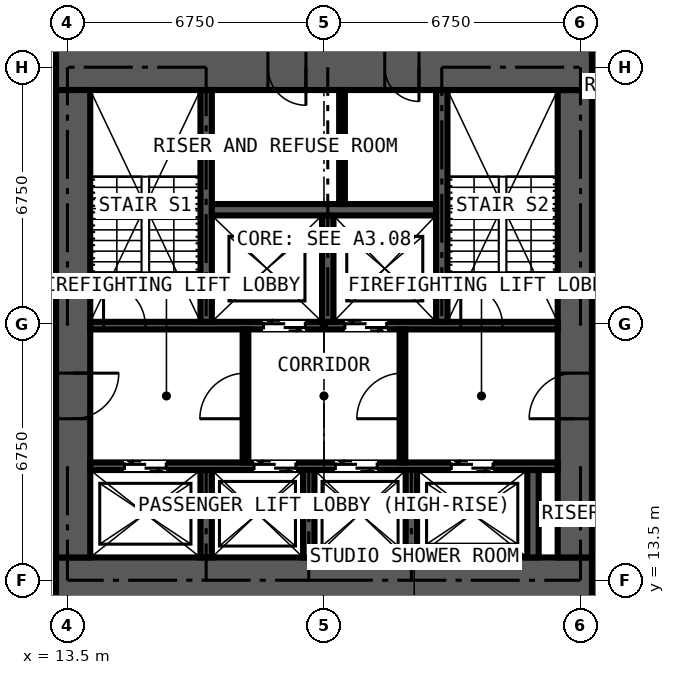
"""IFC4 building model, lengths in metres.
Left out: names, types, materials, properties, quantities, classifications, styles, units other than length and angle.
Written with IfcOpenShell. Run it as: python <this file> out.ifc"""

import sys

from ifc_helpers import new_model, si_unit, direction, frame, frame_2d, origin, place, context, subcontext, project, spatial, rectangle, extrude, element, fill, save


model = new_model("IFC4")
c1 = context("Model", 3, precision=1e-05, world=origin(), true_north=direction((0.0, 1.0)))
c2 = subcontext(c1, "Body", "Model", "MODEL_VIEW")
j1 = project(units=[si_unit("LENGTHUNIT", "METRE"), si_unit("PLANEANGLEUNIT", "RADIAN")], contexts=[c1])
p1 = place(None, origin())
s1 = spatial("IfcSite", under=j1, at=p1, CompositionType="ELEMENT")
p2 = place(p1, origin())
s2 = spatial("IfcBuilding", under=s1, at=p2, CompositionType="ELEMENT")
p3 = place(p2, frame((0.0, 0.0, 211.5)))
s3 = spatial("IfcBuildingStorey", under=s2, at=p3, CompositionType="ELEMENT", Elevation=211.5)
p4 = place(p3, frame((13.2, 13.5, 0.0), z_axis=(0.0, 0.0, 1.0), x_axis=(1.0, 0.0, 0.0)))
e1 = element("IfcWall", 1, at=p4, inside=s3, PredefinedType="SHEAR", context=c2, shape_type="SweptSolid", body=[
    extrude(rectangle(XDim=14.1, YDim=1.2, at=frame_2d((7.05, 0.0))), origin(), (0.0, 0.0, 1.0), 3.6),
])
p5 = place(p3, frame((26.85, 14.1, 0.0), z_axis=(0.0, 0.0, 1.0), x_axis=(0.0, 1.0, 0.0)))
e2 = element("IfcWall", 2, at=p5, inside=s3, PredefinedType="SHEAR", context=c2, shape_type="SweptSolid", body=[
    extrude(rectangle(XDim=12.3, YDim=0.9, at=frame_2d((6.15, 0.0))), origin(), (0.0, 0.0, 1.0), 3.6),
])
p6 = place(p5, frame((3.65, 0.0, 0.0)))
e3 = element("IfcOpeningElement", 3, at=p6, cuts=e2, PredefinedType="OPENING", context=c2, shape_type="SweptSolid", body=[
    extrude(rectangle(XDim=1.2, YDim=2.2, at=frame_2d((0.6, 1.1))), frame((0.0, 0.46, 0.0), z_axis=(0.0, -1.0, 0.0), x_axis=(1.0, 0.0, 0.0)), (0.0, 0.0, 1.0), 0.92),
])
p7 = place(p3, frame((27.3, 27.0, 0.0), z_axis=(0.0, 0.0, 1.0), x_axis=(-1.0, 0.0, 0.0)))
e4 = element("IfcWall", 4, at=p7, inside=s3, PredefinedType="SHEAR", context=c2, shape_type="SweptSolid", body=[
    extrude(rectangle(XDim=14.1, YDim=1.2, at=frame_2d((7.05, 0.0))), origin(), (0.0, 0.0, 1.0), 3.6),
])
p8 = place(p7, frame((4.55, 0.0, 0.0)))
e5 = element("IfcOpeningElement", 5, at=p8, cuts=e4, PredefinedType="OPENING", context=c2, shape_type="SweptSolid", body=[
    extrude(rectangle(XDim=0.9, YDim=2.2, at=frame_2d((0.45, 1.1))), frame((0.0, 0.61, 0.0), z_axis=(0.0, -1.0, 0.0), x_axis=(1.0, 0.0, 0.0)), (0.0, 0.0, 1.0), 1.22),
])
p9 = place(p7, frame((7.525, 0.0, 0.0)))
e6 = element("IfcOpeningElement", 6, at=p9, cuts=e4, PredefinedType="OPENING", context=c2, shape_type="SweptSolid", body=[
    extrude(rectangle(XDim=1.0, YDim=2.2, at=frame_2d((0.5, 1.1))), frame((0.0, 0.61, 0.0), z_axis=(0.0, -1.0, 0.0), x_axis=(1.0, 0.0, 0.0)), (0.0, 0.0, 1.0), 1.22),
])
p10 = place(p3, frame((13.65, 26.4, 0.0), z_axis=(0.0, 0.0, 1.0), x_axis=(0.0, -1.0, 0.0)))
e7 = element("IfcWall", 7, at=p10, inside=s3, PredefinedType="SHEAR", context=c2, shape_type="SweptSolid", body=[
    extrude(rectangle(XDim=12.3, YDim=0.9, at=frame_2d((6.15, 0.0))), origin(), (0.0, 0.0, 1.0), 3.6),
])
p11 = place(p10, frame((7.45, 0.0, 0.0)))
e8 = element("IfcOpeningElement", 8, at=p11, cuts=e7, PredefinedType="OPENING", context=c2, shape_type="SweptSolid", body=[
    extrude(rectangle(XDim=1.2, YDim=2.2, at=frame_2d((0.6, 1.1))), frame((0.0, 0.46, 0.0), z_axis=(0.0, -1.0, 0.0), x_axis=(1.0, 0.0, 0.0)), (0.0, 0.0, 1.0), 0.92),
])
p12 = place(p3, frame((14.1, 16.5, 0.0), z_axis=(0.0, 0.0, 1.0), x_axis=(1.0, 0.0, 0.0)))
e9 = element("IfcWall", 9, at=p12, inside=s3, PredefinedType="SHEAR", context=c2, shape_type="SweptSolid", body=[
    extrude(rectangle(XDim=12.3, YDim=0.2, at=frame_2d((6.15, 0.0))), origin(), (0.0, 0.0, 1.0), 3.6),
])
p13 = place(p12, frame((0.9, 0.0, 0.0)))
e10 = element("IfcOpeningElement", 10, at=p13, cuts=e9, PredefinedType="OPENING", context=c2, shape_type="SweptSolid", body=[
    extrude(rectangle(XDim=1.1, YDim=2.2, at=frame_2d((0.55, 1.1))), frame((0.0, 0.11, 0.0), z_axis=(0.0, -1.0, 0.0), x_axis=(1.0, 0.0, 0.0)), (0.0, 0.0, 1.0), 0.22),
])
p14 = place(p12, frame((4.31, 0.0, 0.0)))
e11 = element("IfcOpeningElement", 11, at=p14, cuts=e9, PredefinedType="OPENING", context=c2, shape_type="SweptSolid", body=[
    extrude(rectangle(XDim=1.1, YDim=2.2, at=frame_2d((0.55, 1.1))), frame((0.0, 0.11, 0.0), z_axis=(0.0, -1.0, 0.0), x_axis=(1.0, 0.0, 0.0)), (0.0, 0.0, 1.0), 0.22),
])
p15 = place(p12, frame((6.45, 0.0, 0.0)))
e12 = element("IfcOpeningElement", 12, at=p15, cuts=e9, PredefinedType="OPENING", context=c2, shape_type="SweptSolid", body=[
    extrude(rectangle(XDim=1.1, YDim=2.2, at=frame_2d((0.55, 1.1))), frame((0.0, 0.11, 0.0), z_axis=(0.0, -1.0, 0.0), x_axis=(1.0, 0.0, 0.0)), (0.0, 0.0, 1.0), 0.22),
])
p16 = place(p12, frame((9.5, 0.0, 0.0)))
e13 = element("IfcOpeningElement", 13, at=p16, cuts=e9, PredefinedType="OPENING", context=c2, shape_type="SweptSolid", body=[
    extrude(rectangle(XDim=1.1, YDim=2.2, at=frame_2d((0.55, 1.1))), frame((0.0, 0.11, 0.0), z_axis=(0.0, -1.0, 0.0), x_axis=(1.0, 0.0, 0.0)), (0.0, 0.0, 1.0), 0.22),
])
p17 = place(p3, frame((14.1, 20.2, 0.0), z_axis=(0.0, 0.0, 1.0), x_axis=(1.0, 0.0, 0.0)))
e14 = element("IfcWall", 14, at=p17, inside=s3, PredefinedType="SHEAR", context=c2, shape_type="SweptSolid", body=[
    extrude(rectangle(XDim=12.3, YDim=0.2, at=frame_2d((6.15, 0.0))), origin(), (0.0, 0.0, 1.0), 3.6),
])
p18 = place(p17, frame((4.56, 0.0, 0.0)))
e15 = element("IfcOpeningElement", 15, at=p18, cuts=e14, PredefinedType="OPENING", context=c2, shape_type="SweptSolid", body=[
    extrude(rectangle(XDim=1.1, YDim=2.2, at=frame_2d((0.55, 1.1))), frame((0.0, 0.11, 0.0), z_axis=(0.0, -1.0, 0.0), x_axis=(1.0, 0.0, 0.0)), (0.0, 0.0, 1.0), 0.22),
])
p19 = place(p17, frame((6.7, 0.0, 0.0)))
e16 = element("IfcOpeningElement", 16, at=p19, cuts=e14, PredefinedType="OPENING", context=c2, shape_type="SweptSolid", body=[
    extrude(rectangle(XDim=1.1, YDim=2.2, at=frame_2d((0.55, 1.1))), frame((0.0, 0.11, 0.0), z_axis=(0.0, -1.0, 0.0), x_axis=(1.0, 0.0, 0.0)), (0.0, 0.0, 1.0), 0.22),
])
p20 = place(p17, frame((0.35, 0.0, 0.0)))
e17 = element("IfcOpeningElement", 17, at=p20, cuts=e14, PredefinedType="OPENING", context=c2, shape_type="SweptSolid", body=[
    extrude(rectangle(XDim=1.1, YDim=2.2, at=frame_2d((0.55, 1.1))), frame((0.0, 0.11, 0.0), z_axis=(0.0, -1.0, 0.0), x_axis=(1.0, 0.0, 0.0)), (0.0, 0.0, 1.0), 0.22),
])
p21 = place(p17, frame((9.75, 0.0, 0.0)))
e18 = element("IfcOpeningElement", 18, at=p21, cuts=e14, PredefinedType="OPENING", context=c2, shape_type="SweptSolid", body=[
    extrude(rectangle(XDim=1.1, YDim=2.2, at=frame_2d((0.55, 1.1))), frame((0.0, 0.11, 0.0), z_axis=(0.0, -1.0, 0.0), x_axis=(1.0, 0.0, 0.0)), (0.0, 0.0, 1.0), 0.22),
])
for number, where, z_axis, x_axis in (
    (19, (17.15, 20.3, 0.0), (0.0, 0.0, 1.0), (0.0, 1.0, 0.0)),
    (20, (23.35, 20.3, 0.0), (0.0, 0.0, 1.0), (0.0, 1.0, 0.0)),
):
    element("IfcWall", number, at=place(p3, frame(where, z_axis=z_axis, x_axis=x_axis)), inside=s3, PredefinedType="SHEAR", context=c2, shape_type="SweptSolid", body=[
        extrude(rectangle(XDim=6.1, YDim=0.3, at=frame_2d((3.05, 0.0))), origin(), (0.0, 0.0, 1.0), 3.6),
    ])
p22 = place(p3, frame((20.35, 20.3, 0.0), z_axis=(0.0, 0.0, 1.0), x_axis=(0.0, 1.0, 0.0)))
e21 = element("IfcWall", 21, at=p22, inside=s3, PredefinedType="SHEAR", context=c2, shape_type="SweptSolid", body=[
    extrude(rectangle(XDim=2.8, YDim=0.3, at=frame_2d((1.4, 0.0))), origin(), (0.0, 0.0, 1.0), 3.6),
])
p23 = place(p3, frame((17.3, 23.25, 0.0), z_axis=(0.0, 0.0, 1.0), x_axis=(1.0, 0.0, 0.0)))
e22 = element("IfcWall", 22, at=p23, inside=s3, PredefinedType="SHEAR", context=c2, shape_type="SweptSolid", body=[
    extrude(rectangle(XDim=5.9, YDim=0.3, at=frame_2d((2.95, 0.0))), origin(), (0.0, 0.0, 1.0), 3.6),
])
for number, where, z_axis, x_axis in (
    (23, (17.15, 14.1, 0.0), (0.0, 0.0, 1.0), (0.0, 1.0, 0.0)),
    (24, (19.85, 14.1, 0.0), (0.0, 0.0, 1.0), (0.0, 1.0, 0.0)),
    (25, (22.55, 14.1, 0.0), (0.0, 0.0, 1.0), (0.0, 1.0, 0.0)),
    (26, (25.75, 14.1, 0.0), (0.0, 0.0, 1.0), (0.0, 1.0, 0.0)),
):
    element("IfcWall", number, at=place(p3, frame(where, z_axis=z_axis, x_axis=x_axis)), inside=s3, PredefinedType="SHEAR", context=c2, shape_type="SweptSolid", body=[
        extrude(rectangle(XDim=2.3, YDim=0.3, at=frame_2d((1.15, 0.0))), origin(), (0.0, 0.0, 1.0), 3.6),
    ])
p24 = place(p3, frame((18.185, 16.6, 0.0), z_axis=(0.0, 0.0, 1.0), x_axis=(0.0, 1.0, 0.0)))
e27 = element("IfcWall", 27, at=p24, inside=s3, PredefinedType="PARTITIONING", context=c2, shape_type="SweptSolid", body=[
    extrude(rectangle(XDim=3.5, YDim=0.15, at=frame_2d((1.75, 0.0))), origin(), (0.0, 0.0, 1.0), 3.375),
])
p25 = place(p24, frame((1.15, 0.0, 0.0)))
e28 = element("IfcOpeningElement", 28, at=p25, cuts=e27, PredefinedType="OPENING", context=c2, shape_type="SweptSolid", body=[
    extrude(rectangle(XDim=1.2, YDim=2.2, at=frame_2d((0.6, 1.1))), frame((0.0, 0.085, 0.0), z_axis=(0.0, -1.0, 0.0), x_axis=(1.0, 0.0, 0.0)), (0.0, 0.0, 1.0), 0.17),
])
p26 = place(p3, frame((22.315, 16.6, 0.0), z_axis=(0.0, 0.0, 1.0), x_axis=(0.0, 1.0, 0.0)))
e29 = element("IfcWall", 29, at=p26, inside=s3, PredefinedType="PARTITIONING", context=c2, shape_type="SweptSolid", body=[
    extrude(rectangle(XDim=3.5, YDim=0.15, at=frame_2d((1.75, 0.0))), origin(), (0.0, 0.0, 1.0), 3.375),
])
p27 = place(p26, frame((1.15, 0.0, 0.0)))
e30 = element("IfcOpeningElement", 30, at=p27, cuts=e29, PredefinedType="OPENING", context=c2, shape_type="SweptSolid", body=[
    extrude(rectangle(XDim=1.2, YDim=2.2, at=frame_2d((0.6, 1.1))), frame((0.0, 0.085, 0.0), z_axis=(0.0, -1.0, 0.0), x_axis=(1.0, 0.0, 0.0)), (0.0, 0.0, 1.0), 0.17),
])
p28 = place(p3, frame((20.725, 23.4, 0.0), z_axis=(0.0, 0.0, 1.0), x_axis=(0.0, 1.0, 0.0)))
e31 = element("IfcWall", 31, at=p28, inside=s3, PredefinedType="PARTITIONING", context=c2, shape_type="SweptSolid", body=[
    extrude(rectangle(XDim=3.0, YDim=0.15, at=frame_2d((1.5, 0.0))), origin(), (0.0, 0.0, 1.0), 3.375),
])
p29 = place(p13, origin())
e32 = element("IfcDoor", 32, at=p29, inside=s3, OperationType="DOUBLE_DOOR_SLIDING", PredefinedType="DOOR", context=c2, shape_type="SweptSolid", body=[
    extrude(rectangle(XDim=1.1, YDim=2.2, at=frame_2d((0.55, 1.1))), frame((0.0, 0.025, 0.0), z_axis=(0.0, -1.0, 0.0), x_axis=(1.0, 0.0, 0.0)), (0.0, 0.0, 1.0), 0.05),
])
fill(e10, e32)
p30 = place(p14, origin())
e33 = element("IfcDoor", 33, at=p30, inside=s3, OperationType="DOUBLE_DOOR_SLIDING", PredefinedType="DOOR", context=c2, shape_type="SweptSolid", body=[
    extrude(rectangle(XDim=1.1, YDim=2.2, at=frame_2d((0.55, 1.1))), frame((0.0, 0.025, 0.0), z_axis=(0.0, -1.0, 0.0), x_axis=(1.0, 0.0, 0.0)), (0.0, 0.0, 1.0), 0.05),
])
fill(e11, e33)
p31 = place(p15, origin())
e34 = element("IfcDoor", 34, at=p31, inside=s3, OperationType="DOUBLE_DOOR_SLIDING", PredefinedType="DOOR", context=c2, shape_type="SweptSolid", body=[
    extrude(rectangle(XDim=1.1, YDim=2.2, at=frame_2d((0.55, 1.1))), frame((0.0, 0.025, 0.0), z_axis=(0.0, -1.0, 0.0), x_axis=(1.0, 0.0, 0.0)), (0.0, 0.0, 1.0), 0.05),
])
fill(e12, e34)
p32 = place(p16, origin())
e35 = element("IfcDoor", 35, at=p32, inside=s3, OperationType="DOUBLE_DOOR_SLIDING", PredefinedType="DOOR", context=c2, shape_type="SweptSolid", body=[
    extrude(rectangle(XDim=1.1, YDim=2.2, at=frame_2d((0.55, 1.1))), frame((0.0, 0.025, 0.0), z_axis=(0.0, -1.0, 0.0), x_axis=(1.0, 0.0, 0.0)), (0.0, 0.0, 1.0), 0.05),
])
fill(e13, e35)
p33 = place(p18, origin())
e36 = element("IfcDoor", 36, at=p33, inside=s3, OperationType="DOUBLE_DOOR_SLIDING", PredefinedType="DOOR", context=c2, shape_type="SweptSolid", body=[
    extrude(rectangle(XDim=1.1, YDim=2.2, at=frame_2d((0.55, 1.1))), frame((0.0, 0.025, 0.0), z_axis=(0.0, -1.0, 0.0), x_axis=(1.0, 0.0, 0.0)), (0.0, 0.0, 1.0), 0.05),
])
fill(e15, e36)
p34 = place(p19, origin())
e37 = element("IfcDoor", 37, at=p34, inside=s3, OperationType="DOUBLE_DOOR_SLIDING", PredefinedType="DOOR", context=c2, shape_type="SweptSolid", body=[
    extrude(rectangle(XDim=1.1, YDim=2.2, at=frame_2d((0.55, 1.1))), frame((0.0, 0.025, 0.0), z_axis=(0.0, -1.0, 0.0), x_axis=(1.0, 0.0, 0.0)), (0.0, 0.0, 1.0), 0.05),
])
fill(e16, e37)
p35 = place(p11, origin())
e38 = element("IfcDoor", 38, at=p35, inside=s3, OperationType="DOUBLE_DOOR_SINGLE_SWING", PredefinedType="DOOR", context=c2, shape_type="SweptSolid", body=[
    extrude(rectangle(XDim=1.2, YDim=2.2, at=frame_2d((0.6, 1.1))), frame((0.0, 0.025, 0.0), z_axis=(0.0, -1.0, 0.0), x_axis=(1.0, 0.0, 0.0)), (0.0, 0.0, 1.0), 0.05),
])
fill(e8, e38)
p36 = place(p6, origin())
e39 = element("IfcDoor", 39, at=p36, inside=s3, OperationType="DOUBLE_DOOR_SINGLE_SWING", PredefinedType="DOOR", context=c2, shape_type="SweptSolid", body=[
    extrude(rectangle(XDim=1.2, YDim=2.2, at=frame_2d((0.6, 1.1))), frame((0.0, 0.025, 0.0), z_axis=(0.0, -1.0, 0.0), x_axis=(1.0, 0.0, 0.0)), (0.0, 0.0, 1.0), 0.05),
])
fill(e3, e39)
p37 = place(p25, origin())
e40 = element("IfcDoor", 40, at=p37, inside=s3, OperationType="DOUBLE_DOOR_SINGLE_SWING", PredefinedType="DOOR", context=c2, shape_type="SweptSolid", body=[
    extrude(rectangle(XDim=1.2, YDim=2.2, at=frame_2d((0.6, 1.1))), frame((0.0, 0.025, 0.0), z_axis=(0.0, -1.0, 0.0), x_axis=(1.0, 0.0, 0.0)), (0.0, 0.0, 1.0), 0.05),
])
fill(e28, e40)
p38 = place(p27, origin())
e41 = element("IfcDoor", 41, at=p38, inside=s3, OperationType="DOUBLE_DOOR_SINGLE_SWING", PredefinedType="DOOR", context=c2, shape_type="SweptSolid", body=[
    extrude(rectangle(XDim=1.2, YDim=2.2, at=frame_2d((0.6, 1.1))), frame((0.0, 0.025, 0.0), z_axis=(0.0, -1.0, 0.0), x_axis=(1.0, 0.0, 0.0)), (0.0, 0.0, 1.0), 0.05),
])
fill(e30, e41)
p39 = place(p8, origin())
e42 = element("IfcDoor", 42, at=p39, inside=s3, OperationType="SINGLE_SWING_LEFT", PredefinedType="DOOR", context=c2, shape_type="SweptSolid", body=[
    extrude(rectangle(XDim=0.9, YDim=2.2, at=frame_2d((0.45, 1.1))), frame((0.0, 0.4, 0.0), z_axis=(0.0, -1.0, 0.0), x_axis=(1.0, 0.0, 0.0)), (0.0, 0.0, 1.0), 0.8),
])
fill(e5, e42)
p40 = place(p9, origin())
e43 = element("IfcDoor", 43, at=p40, inside=s3, OperationType="SINGLE_SWING_LEFT", PredefinedType="DOOR", context=c2, shape_type="SweptSolid", body=[
    extrude(rectangle(XDim=1.0, YDim=2.2, at=frame_2d((0.5, 1.1))), frame((0.0, 0.025, 0.0), z_axis=(0.0, -1.0, 0.0), x_axis=(1.0, 0.0, 0.0)), (0.0, 0.0, 1.0), 0.05),
])
fill(e6, e43)
p41 = place(p20, origin())
e44 = element("IfcDoor", 44, at=p41, inside=s3, OperationType="SINGLE_SWING_LEFT", PredefinedType="DOOR", context=c2, shape_type="SweptSolid", body=[
    extrude(rectangle(XDim=1.1, YDim=2.2, at=frame_2d((0.55, 1.1))), frame((0.0, 0.025, 0.0), z_axis=(0.0, -1.0, 0.0), x_axis=(1.0, 0.0, 0.0)), (0.0, 0.0, 1.0), 0.05),
])
fill(e17, e44)
p42 = place(p21, origin())
e45 = element("IfcDoor", 45, at=p42, inside=s3, OperationType="SINGLE_SWING_LEFT", PredefinedType="DOOR", context=c2, shape_type="SweptSolid", body=[
    extrude(rectangle(XDim=1.1, YDim=2.2, at=frame_2d((0.55, 1.1))), frame((0.0, 0.025, 0.0), z_axis=(0.0, -1.0, 0.0), x_axis=(1.0, 0.0, 0.0)), (0.0, 0.0, 1.0), 0.05),
])
fill(e18, e45)
save(model, sys.argv[1])
